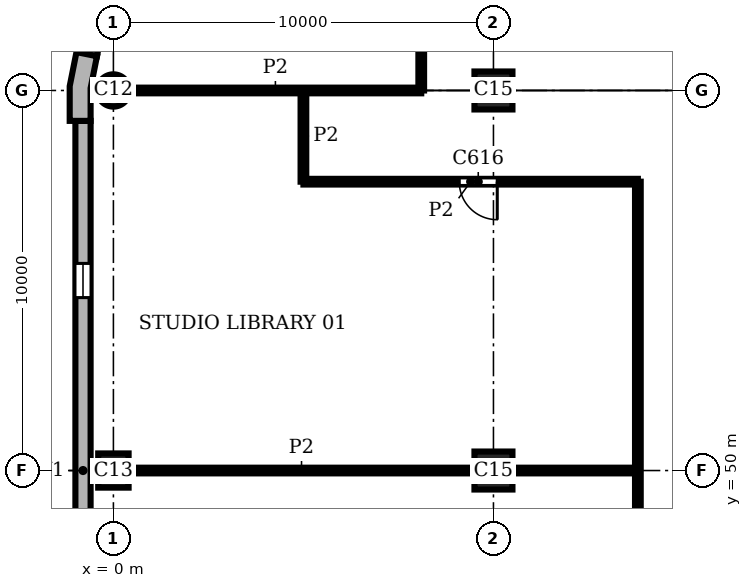
"""IFC4 building model, lengths in metres.
Left out: names, types, materials, properties, quantities, classifications, styles, units other than length and angle.
Written with IfcOpenShell. Run it as: python <this file> out.ifc"""

import sys

from ifc_helpers import new_model, si_unit, direction, frame, frame_2d, origin, origin_2d, place, context, subcontext, project, spatial, polyline, rectangle, circle, outline, extrude, element, fill, save


model = new_model("IFC4")
c1 = context("Model", 3, precision=1e-05, world=origin(), true_north=direction((0.0, 1.0)))
c2 = subcontext(c1, "Body", "Model", "MODEL_VIEW")
j1 = project(units=[si_unit("LENGTHUNIT", "METRE"), si_unit("PLANEANGLEUNIT", "RADIAN")], contexts=[c1])
p1 = place(None, origin())
s1 = spatial("IfcSite", under=j1, at=p1, CompositionType="ELEMENT")
p2 = place(p1, origin())
s2 = spatial("IfcBuilding", under=s1, at=p2, CompositionType="ELEMENT")
p3 = place(p2, frame((0.0, 0.0, 294.3)))
s3 = spatial("IfcBuildingStorey", under=s2, at=p3, CompositionType="ELEMENT", Elevation=294.3)
p4 = place(p3, frame((0.0, 60.0, 0.0), z_axis=(0.0, 0.0, 1.0), x_axis=(1.0, 0.0, 0.0)))
e1 = element("IfcColumn", 1, at=p4, inside=s3, PredefinedType="COLUMN", context=c2, shape_type="SweptSolid", body=[
    extrude(circle(Radius=0.425, at=origin_2d()), origin(), (0.0, 0.0, 1.0), 3.9),
])
p5 = place(p3, frame((0.0, 50.0, 0.0), z_axis=(0.0, 0.0, 1.0), x_axis=(0.0, 1.0, 0.0)))
e2 = element("IfcColumn", 2, at=p5, inside=s3, PredefinedType="COLUMN", context=c2, shape_type="SweptSolid", body=[
    extrude(rectangle(XDim=0.9, YDim=0.8, at=origin_2d()), origin(), (0.0, 0.0, 1.0), 3.9),
])
for number, where, z_axis, x_axis in (
    (3, (10.0, 50.0, 0.0), (0.0, 0.0, 1.0), (1.0, 0.0, 0.0)),
    (4, (10.0, 60.0, 0.0), (0.0, 0.0, 1.0), (1.0, 0.0, 0.0)),
):
    element("IfcColumn", number, at=place(p3, frame(where, z_axis=z_axis, x_axis=x_axis)), inside=s3, PredefinedType="COLUMN", context=c2, shape_type="SweptSolid", body=[
        extrude(rectangle(XDim=1.0, YDim=1.0, at=origin_2d()), origin(), (0.0, 0.0, 1.0), 3.9),
    ])
p6 = place(p3, origin())
e5 = element("IfcWall", 5, at=p6, inside=s3, PredefinedType="SOLIDWALL", context=c2, shape_type="SweptSolid", body=[
    extrude(outline(polyline([(-0.825, 60.98), (-0.972, 61.009), (-1.15, 60.113), (-1.15, 59.2), (-1.0, 59.2), (-0.6, 59.2), (-0.6, 60.059), (-0.432, 60.902), (-0.825, 60.98)])), origin(), (0.0, 0.0, 1.0), 3.9),
])
p7 = place(p3, frame((0.299, 65.602, 0.0), z_axis=(0.0, 0.0, 1.0), x_axis=(-0.195098533057, -0.98078364709, 0.0)))
e6 = element("IfcWall", 6, at=p7, inside=s3, PredefinedType="SOLIDWALL", context=c2, shape_type="SweptSolid", body=[
    extrude(rectangle(XDim=4.753, YDim=0.4, at=frame_2d((2.376, 0.0))), origin(), (0.0, 0.0, 1.0), 3.9),
])
p8 = place(p7, frame((0.226, 0.0, 0.9)))
e7 = element("IfcOpeningElement", 7, at=p8, cuts=e6, PredefinedType="OPENING", context=c2, shape_type="SweptSolid", body=[
    extrude(rectangle(XDim=4.3, YDim=2.35, at=frame_2d((2.15, 1.175))), frame((0.0, 0.21, 0.0), z_axis=(0.0, -1.0, 0.0), x_axis=(1.0, 0.0, 0.0)), (0.0, 0.0, 1.0), 0.42),
])
p9 = place(p3, frame((-0.8, 59.2, 0.0), z_axis=(0.0, 0.0, 1.0), x_axis=(0.0, -1.0, 0.0)))
e8 = element("IfcWall", 8, at=p9, inside=s3, PredefinedType="SOLIDWALL", context=c2, shape_type="SweptSolid", body=[
    extrude(rectangle(XDim=18.4, YDim=0.4, at=frame_2d((9.2, 0.0))), origin(), (0.0, 0.0, 1.0), 3.9),
])
p10 = place(p9, frame((3.75, 0.0, 0.9)))
e9 = element("IfcOpeningElement", 9, at=p10, cuts=e8, PredefinedType="OPENING", context=c2, shape_type="SweptSolid", body=[
    extrude(rectangle(XDim=0.9, YDim=2.35, at=frame_2d((0.45, 1.175))), frame((0.0, 0.21, 0.0), z_axis=(0.0, -1.0, 0.0), x_axis=(1.0, 0.0, 0.0)), (0.0, 0.0, 1.0), 0.42),
])
p11 = place(p9, frame((13.75, 0.0, 0.9)))
e10 = element("IfcOpeningElement", 10, at=p11, cuts=e8, PredefinedType="OPENING", context=c2, shape_type="SweptSolid", body=[
    extrude(rectangle(XDim=0.9, YDim=2.35, at=frame_2d((0.45, 1.175))), frame((0.0, 0.21, 0.0), z_axis=(0.0, -1.0, 0.0), x_axis=(1.0, 0.0, 0.0)), (0.0, 0.0, 1.0), 0.42),
])
p12 = place(p3, frame((5.0, 57.6, 0.0), z_axis=(0.0, 0.0, 1.0), x_axis=(0.0, 1.0, 0.0)))
e11 = element("IfcWall", 11, at=p12, inside=s3, PredefinedType="PARTITIONING", context=c2, shape_type="SweptSolid", body=[
    extrude(rectangle(XDim=2.4, YDim=0.15, at=frame_2d((1.2, 0.0))), origin(), (0.0, 0.0, 1.0), 3.58),
])
p13 = place(p3, frame((8.1, 60.0, 0.0), z_axis=(0.0, 0.0, 1.0), x_axis=(0.0, 1.0, 0.0)))
e12 = element("IfcWall", 12, at=p13, inside=s3, PredefinedType="PARTITIONING", context=c2, shape_type="SweptSolid", body=[
    extrude(rectangle(XDim=6.4, YDim=0.15, at=frame_2d((3.2, 0.0))), origin(), (0.0, 0.0, 1.0), 3.58),
])
p14 = place(p13, frame((2.1, 0.0, 0.0)))
e13 = element("IfcOpeningElement", 13, at=p14, cuts=e12, PredefinedType="OPENING", context=c2, shape_type="SweptSolid", body=[
    extrude(rectangle(XDim=1.8, YDim=2.1, at=frame_2d((0.9, 1.05))), frame((0.0, 0.085, 0.0), z_axis=(0.0, -1.0, 0.0), x_axis=(1.0, 0.0, 0.0)), (0.0, 0.0, 1.0), 0.17),
])
p15 = place(p3, frame((13.8, 28.0, 0.0), z_axis=(0.0, 0.0, 1.0), x_axis=(0.0, 1.0, 0.0)))
e14 = element("IfcWall", 14, at=p15, inside=s3, PredefinedType="PARTITIONING", context=c2, shape_type="SweptSolid", body=[
    extrude(rectangle(XDim=29.6, YDim=0.15, at=frame_2d((14.8, 0.0))), origin(), (0.0, 0.0, 1.0), 3.58),
])
p16 = place(p15, frame((9.901, 0.0, 0.0)))
e15 = element("IfcOpeningElement", 15, at=p16, cuts=e14, PredefinedType="OPENING", context=c2, shape_type="SweptSolid", body=[
    extrude(rectangle(XDim=1.8, YDim=2.1, at=frame_2d((0.9, 1.05))), frame((0.0, 0.085, 0.0), z_axis=(0.0, -1.0, 0.0), x_axis=(1.0, 0.0, 0.0)), (0.0, 0.0, 1.0), 0.17),
])
p17 = place(p3, frame((0.4, 50.0, 0.0), z_axis=(0.0, 0.0, 1.0), x_axis=(1.0, 0.0, 0.0)))
e16 = element("IfcWall", 16, at=p17, inside=s3, PredefinedType="PARTITIONING", context=c2, shape_type="SweptSolid", body=[
    extrude(rectangle(XDim=9.1, YDim=0.15, at=frame_2d((4.55, 0.0))), origin(), (0.0, 0.0, 1.0), 3.58),
])
p18 = place(p3, frame((10.5, 50.0, 0.0), z_axis=(0.0, 0.0, 1.0), x_axis=(1.0, 0.0, 0.0)))
e17 = element("IfcWall", 17, at=p18, inside=s3, PredefinedType="PARTITIONING", context=c2, shape_type="SweptSolid", body=[
    extrude(rectangle(XDim=3.3, YDim=0.15, at=frame_2d((1.65, 0.0))), origin(), (0.0, 0.0, 1.0), 3.58),
])
p19 = place(p3, frame((5.0, 57.6, 0.0), z_axis=(0.0, 0.0, 1.0), x_axis=(1.0, 0.0, 0.0)))
e18 = element("IfcWall", 18, at=p19, inside=s3, PredefinedType="PARTITIONING", context=c2, shape_type="SweptSolid", body=[
    extrude(rectangle(XDim=8.8, YDim=0.15, at=frame_2d((4.4, 0.0))), origin(), (0.0, 0.0, 1.0), 3.58),
])
p20 = place(p19, frame((4.1, 0.0, 0.0)))
e19 = element("IfcOpeningElement", 19, at=p20, cuts=e18, PredefinedType="OPENING", context=c2, shape_type="SweptSolid", body=[
    extrude(rectangle(XDim=1.0, YDim=2.1, at=frame_2d((0.5, 1.05))), frame((0.0, 0.085, 0.0), z_axis=(0.0, -1.0, 0.0), x_axis=(1.0, 0.0, 0.0)), (0.0, 0.0, 1.0), 0.17),
])
p21 = place(p3, frame((0.425, 60.0, 0.0), z_axis=(0.0, 0.0, 1.0), x_axis=(1.0, 0.0, 0.0)))
e20 = element("IfcWall", 20, at=p21, inside=s3, PredefinedType="PARTITIONING", context=c2, shape_type="SweptSolid", body=[
    extrude(rectangle(XDim=7.675, YDim=0.15, at=frame_2d((3.837, 0.0))), origin(), (0.0, 0.0, 1.0), 3.58),
])
p22 = place(p10, origin())
e21 = element("IfcWindow", 21, at=p22, inside=s3, PartitioningType="SINGLE_PANEL", PredefinedType="WINDOW", context=c2, shape_type="SweptSolid", body=[
    extrude(rectangle(XDim=0.9, YDim=2.35, at=frame_2d((0.45, 1.175))), frame((0.0, 0.16, 0.0), z_axis=(0.0, -1.0, 0.0), x_axis=(1.0, 0.0, 0.0)), (0.0, 0.0, 1.0), 0.06),
])
fill(e9, e21)
p23 = place(p20, frame((1.0, 0.0, 0.0), z_axis=(0.0, 0.0, 1.0), x_axis=(-1.0, 0.0, 0.0)))
e22 = element("IfcDoor", 22, at=p23, inside=s3, OperationType="SINGLE_SWING_LEFT", PredefinedType="DOOR", context=c2, shape_type="SweptSolid", body=[
    extrude(rectangle(XDim=1.0, YDim=2.1, at=frame_2d((0.5, 1.05))), frame((0.0, 0.025, 0.0), z_axis=(0.0, -1.0, 0.0), x_axis=(1.0, 0.0, 0.0)), (0.0, 0.0, 1.0), 0.05),
])
fill(e19, e22)
save(model, sys.argv[1])
